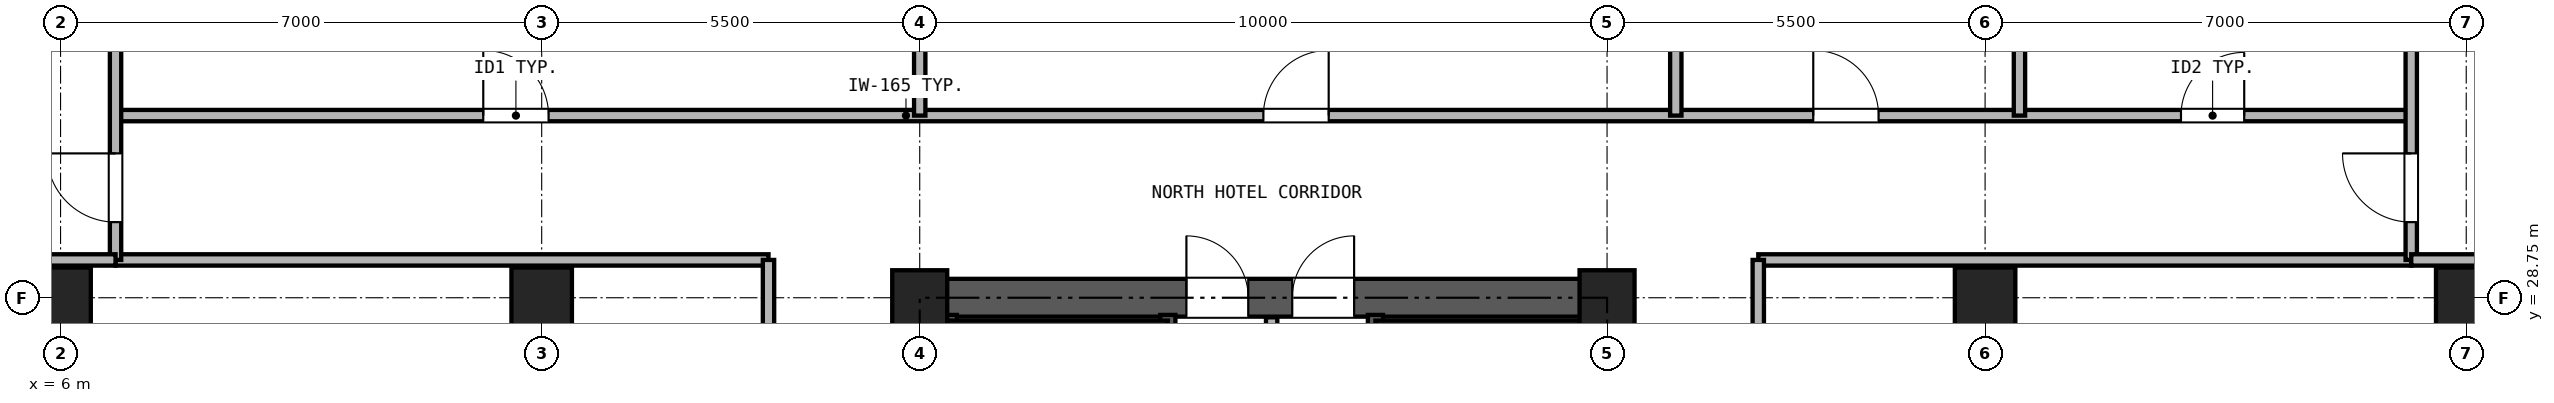
"""IFC4 building model, lengths in metres.
Left out: names, types, materials, properties, quantities, classifications, styles, units other than length and angle.
Written with IfcOpenShell. Run it as: python <this file> out.ifc"""

import sys

from ifc_helpers import new_model, si_unit, direction, frame, frame_2d, origin, origin_2d, place, context, subcontext, project, spatial, rectangle, hollow_rectangle, extrude, source, transform, mapped, element, fill, save


model = new_model("IFC4")
c1 = context("Model", 3, precision=1e-05, world=origin(), true_north=direction((0.0, 1.0)))
c2 = subcontext(c1, "Body", "Model", "MODEL_VIEW")
j1 = project(units=[si_unit("LENGTHUNIT", "METRE"), si_unit("PLANEANGLEUNIT", "RADIAN")], contexts=[c1])
p1 = place(None, origin())
s1 = spatial("IfcSite", under=j1, at=p1, CompositionType="ELEMENT")
p2 = place(p1, origin())
s2 = spatial("IfcBuilding", under=s1, at=p2, CompositionType="ELEMENT")
p3 = place(p2, frame((0.0, 0.0, 92.7)))
s3 = spatial("IfcBuildingStorey", under=s2, at=p3, CompositionType="ELEMENT", Elevation=92.7)
m1 = source(origin(), c2, "Body", "SweptSolid", [
    extrude(hollow_rectangle(XDim=0.88, YDim=0.88, WallThickness=0.05, at=origin_2d()), origin(), (0.0, 0.0, 1.0), 2.95),
])
for number, where, z_axis, x_axis in (
    (1, (6.0, 28.75, 0.0), (0.0, 0.0, 1.0), (1.0, 0.0, 0.0)),
    (2, (13.0, 28.75, 0.0), (0.0, 0.0, 1.0), (1.0, 0.0, 0.0)),
):
    element("IfcColumn", number, at=place(p3, frame(where, z_axis=z_axis, x_axis=x_axis)), inside=s3, PredefinedType="COLUMN", context=c2, shape_type="MappedRepresentation", body=[
        mapped(m1, transform((0.0, 0.0, 0.0), x_axis=(1.0, 0.0, 0.0), y_axis=(0.0, 1.0, 0.0), z_axis=(0.0, 0.0, 1.0), scale=1.0)),
    ])
m2 = source(origin(), c2, "Body", "SweptSolid", [
    extrude(hollow_rectangle(XDim=0.8, YDim=0.8, WallThickness=0.045, at=origin_2d()), origin(), (0.0, 0.0, 1.0), 2.95),
])
for number, where, z_axis, x_axis in (
    (3, (18.5, 28.75, 0.0), (0.0, 0.0, 1.0), (1.0, 0.0, 0.0)),
    (4, (28.5, 28.75, 0.0), (0.0, 0.0, 1.0), (1.0, 0.0, 0.0)),
):
    element("IfcColumn", number, at=place(p3, frame(where, z_axis=z_axis, x_axis=x_axis)), inside=s3, PredefinedType="COLUMN", context=c2, shape_type="MappedRepresentation", body=[
        mapped(m2, transform((0.0, 0.0, 0.0), x_axis=(1.0, 0.0, 0.0), y_axis=(0.0, 1.0, 0.0), z_axis=(0.0, 0.0, 1.0), scale=1.0)),
    ])
for number, where, z_axis, x_axis in (
    (5, (34.0, 28.75, 0.0), (0.0, 0.0, 1.0), (1.0, 0.0, 0.0)),
    (6, (41.0, 28.75, 0.0), (0.0, 0.0, 1.0), (1.0, 0.0, 0.0)),
):
    element("IfcColumn", number, at=place(p3, frame(where, z_axis=z_axis, x_axis=x_axis)), inside=s3, PredefinedType="COLUMN", context=c2, shape_type="MappedRepresentation", body=[
        mapped(m1, transform((0.0, 0.0, 0.0), x_axis=(1.0, 0.0, 0.0), y_axis=(0.0, 1.0, 0.0), z_axis=(0.0, 0.0, 1.0), scale=1.0)),
    ])
p4 = place(p3, frame((18.225, 28.75, 0.0), z_axis=(0.0, 0.0, 1.0), x_axis=(1.0, 0.0, 0.0)))
e7 = element("IfcWall", 7, at=p4, inside=s3, PredefinedType="SHEAR", context=c2, shape_type="SweptSolid", body=[
    extrude(rectangle(XDim=10.55, YDim=0.55, at=frame_2d((5.275, 0.0))), origin(), (0.0, 0.0, 1.0), 2.95),
])
p5 = place(p4, frame((4.155, 0.0, 0.0)))
e8 = element("IfcOpeningElement", 8, at=p5, cuts=e7, PredefinedType="OPENING", context=c2, shape_type="SweptSolid", body=[
    extrude(rectangle(XDim=0.9, YDim=2.05, at=frame_2d((0.45, 1.025))), frame((0.0, 0.285, 0.0), z_axis=(0.0, -1.0, 0.0), x_axis=(1.0, 0.0, 0.0)), (0.0, 0.0, 1.0), 0.57),
])
p6 = place(p4, frame((5.695, 0.0, 0.0)))
e9 = element("IfcOpeningElement", 9, at=p6, cuts=e7, PredefinedType="OPENING", context=c2, shape_type="SweptSolid", body=[
    extrude(rectangle(XDim=0.9, YDim=2.05, at=frame_2d((0.45, 1.025))), frame((0.0, 0.285, 0.0), z_axis=(0.0, -1.0, 0.0), x_axis=(1.0, 0.0, 0.0)), (0.0, 0.0, 1.0), 0.57),
])
p7 = place(p3, frame((18.5, 11.775, 0.0), z_axis=(0.0, 0.0, 1.0), x_axis=(0.0, 1.0, 0.0)))
e10 = element("IfcWall", 10, at=p7, inside=s3, PredefinedType="SHEAR", context=c2, shape_type="SweptSolid", body=[
    extrude(rectangle(XDim=16.7, YDim=0.55, at=frame_2d((8.35, 0.0))), origin(), (0.0, 0.0, 1.0), 2.95),
])
p8 = place(p7, frame((7.375, 0.0, 0.0)))
e11 = element("IfcOpeningElement", 11, at=p8, cuts=e10, PredefinedType="OPENING", context=c2, shape_type="SweptSolid", body=[
    extrude(rectangle(XDim=1.15, YDim=2.2, at=frame_2d((0.575, 1.1))), frame((0.0, 0.285, 0.0), z_axis=(0.0, -1.0, 0.0), x_axis=(1.0, 0.0, 0.0)), (0.0, 0.0, 1.0), 0.57),
])
p9 = place(p3, frame((28.5, 11.775, 0.0), z_axis=(0.0, 0.0, 1.0), x_axis=(0.0, 1.0, 0.0)))
e12 = element("IfcWall", 12, at=p9, inside=s3, PredefinedType="SHEAR", context=c2, shape_type="SweptSolid", body=[
    extrude(rectangle(XDim=16.7, YDim=0.55, at=frame_2d((8.35, 0.0))), origin(), (0.0, 0.0, 1.0), 2.95),
])
p10 = place(p9, frame((7.375, 0.0, 0.0)))
e13 = element("IfcOpeningElement", 13, at=p10, cuts=e12, PredefinedType="OPENING", context=c2, shape_type="SweptSolid", body=[
    extrude(rectangle(XDim=1.15, YDim=2.2, at=frame_2d((0.575, 1.1))), frame((0.0, 0.285, 0.0), z_axis=(0.0, -1.0, 0.0), x_axis=(1.0, 0.0, 0.0)), (0.0, 0.0, 1.0), 0.57),
])
for number, where, z_axis, x_axis in (
    (14, (18.93, 21.39, 0.0), (0.0, 0.0, 1.0), (0.0, 1.0, 0.0)),
    (15, (22.11, 21.39, 0.0), (0.0, 0.0, 1.0), (0.0, 1.0, 0.0)),
    (16, (25.13, 21.39, 0.0), (0.0, 0.0, 1.0), (0.0, 1.0, 0.0)),
):
    element("IfcWall", number, at=place(p3, frame(where, z_axis=z_axis, x_axis=x_axis)), inside=s3, PredefinedType="SOLIDWALL", context=c2, shape_type="SweptSolid", body=[
        extrude(rectangle(XDim=7.11, YDim=0.22, at=frame_2d((3.555, 0.0))), origin(), (0.0, 0.0, 1.0), 2.95),
    ])
p11 = place(p3, frame((18.785, 28.335, 0.0), z_axis=(0.0, 0.0, 1.0), x_axis=(1.0, 0.0, 0.0)))
e17 = element("IfcWall", 17, at=p11, inside=s3, PredefinedType="PARTITIONING", context=c2, shape_type="SweptSolid", body=[
    extrude(rectangle(XDim=3.325, YDim=0.165, at=frame_2d((1.663, 0.0))), origin(), (0.0, 0.0, 1.0), 2.95),
])
p12 = place(p3, frame((25.13, 28.335, 0.0), z_axis=(0.0, 0.0, 1.0), x_axis=(1.0, 0.0, 0.0)))
e18 = element("IfcWall", 18, at=p12, inside=s3, PredefinedType="PARTITIONING", context=c2, shape_type="SweptSolid", body=[
    extrude(rectangle(XDim=3.085, YDim=0.165, at=frame_2d((1.542, 0.0))), origin(), (0.0, 0.0, 1.0), 2.95),
])
p13 = place(p3, frame((23.62, 24.4, 0.0), z_axis=(0.0, 0.0, 1.0), x_axis=(0.0, 1.0, 0.0)))
e19 = element("IfcWall", 19, at=p13, inside=s3, PredefinedType="PARTITIONING", context=c2, shape_type="SweptSolid", body=[
    extrude(rectangle(XDim=4.065, YDim=0.165, at=frame_2d((2.033, 0.0))), origin(), (0.0, 0.0, 1.0), 2.95),
])
p14 = place(p3, frame((6.8, 31.4, 0.0), z_axis=(0.0, 0.0, 1.0), x_axis=(1.0, 0.0, 0.0)))
e20 = element("IfcWall", 20, at=p14, inside=s3, PredefinedType="PARTITIONING", context=c2, shape_type="SweptSolid", body=[
    extrude(rectangle(XDim=33.4, YDim=0.165, at=frame_2d((16.7, 0.0))), origin(), (0.0, 0.0, 1.0), 2.583),
])
p15 = place(p14, frame((5.35, 0.0, 0.0)))
e21 = element("IfcOpeningElement", 21, at=p15, cuts=e20, PredefinedType="OPENING", context=c2, shape_type="SweptSolid", body=[
    extrude(rectangle(XDim=0.95, YDim=2.15, at=frame_2d((0.475, 1.075))), frame((0.0, 0.093, 0.0), z_axis=(0.0, -1.0, 0.0), x_axis=(1.0, 0.0, 0.0)), (0.0, 0.0, 1.0), 0.185),
])
p16 = place(p14, frame((16.7, 0.0, 0.0)))
e22 = element("IfcOpeningElement", 22, at=p16, cuts=e20, PredefinedType="OPENING", context=c2, shape_type="SweptSolid", body=[
    extrude(rectangle(XDim=0.95, YDim=2.15, at=frame_2d((0.475, 1.075))), frame((0.0, 0.093, 0.0), z_axis=(0.0, -1.0, 0.0), x_axis=(1.0, 0.0, 0.0)), (0.0, 0.0, 1.0), 0.185),
])
p17 = place(p14, frame((24.7, 0.0, 0.0)))
e23 = element("IfcOpeningElement", 23, at=p17, cuts=e20, PredefinedType="OPENING", context=c2, shape_type="SweptSolid", body=[
    extrude(rectangle(XDim=0.95, YDim=2.15, at=frame_2d((0.475, 1.075))), frame((0.0, 0.093, 0.0), z_axis=(0.0, -1.0, 0.0), x_axis=(1.0, 0.0, 0.0)), (0.0, 0.0, 1.0), 0.185),
])
p18 = place(p14, frame((30.05, 0.0, 0.0)))
e24 = element("IfcOpeningElement", 24, at=p18, cuts=e20, PredefinedType="OPENING", context=c2, shape_type="SweptSolid", body=[
    extrude(rectangle(XDim=0.92, YDim=2.1, at=frame_2d((0.46, 1.05))), frame((0.0, 0.093, 0.0), z_axis=(0.0, -1.0, 0.0), x_axis=(1.0, 0.0, 0.0)), (0.0, 0.0, 1.0), 0.185),
])
for number, where, z_axis, x_axis in (
    (25, (6.8, 29.3, 0.0), (0.0, 0.0, 1.0), (1.0, 0.0, 0.0)),
    (26, (30.7, 29.3, 0.0), (0.0, 0.0, 1.0), (1.0, 0.0, 0.0)),
):
    element("IfcWall", number, at=place(p3, frame(where, z_axis=z_axis, x_axis=x_axis)), inside=s3, PredefinedType="PARTITIONING", context=c2, shape_type="SweptSolid", body=[
        extrude(rectangle(XDim=9.5, YDim=0.165, at=frame_2d((4.75, 0.0))), origin(), (0.0, 0.0, 1.0), 2.95),
    ])
p19 = place(p3, frame((16.3, 11.05, 0.0), z_axis=(0.0, 0.0, 1.0), x_axis=(0.0, 1.0, 0.0)))
e27 = element("IfcWall", 27, at=p19, inside=s3, PredefinedType="PARTITIONING", context=c2, shape_type="SweptSolid", body=[
    extrude(rectangle(XDim=18.25, YDim=0.165, at=frame_2d((9.125, 0.0))), origin(), (0.0, 0.0, 1.0), 2.95),
])
p20 = place(p19, frame((4.062, 0.0, 0.0)))
e28 = element("IfcOpeningElement", 28, at=p20, cuts=e27, PredefinedType="OPENING", context=c2, shape_type="SweptSolid", body=[
    extrude(rectangle(XDim=0.95, YDim=2.15, at=frame_2d((0.475, 1.075))), frame((0.0, 0.093, 0.0), z_axis=(0.0, -1.0, 0.0), x_axis=(1.0, 0.0, 0.0)), (0.0, 0.0, 1.0), 0.185),
])
p21 = place(p19, frame((13.187, 0.0, 0.0)))
e29 = element("IfcOpeningElement", 29, at=p21, cuts=e27, PredefinedType="OPENING", context=c2, shape_type="SweptSolid", body=[
    extrude(rectangle(XDim=0.95, YDim=2.15, at=frame_2d((0.475, 1.075))), frame((0.0, 0.093, 0.0), z_axis=(0.0, -1.0, 0.0), x_axis=(1.0, 0.0, 0.0)), (0.0, 0.0, 1.0), 0.185),
])
p22 = place(p3, frame((30.7, 11.05, 0.0), z_axis=(0.0, 0.0, 1.0), x_axis=(0.0, 1.0, 0.0)))
e30 = element("IfcWall", 30, at=p22, inside=s3, PredefinedType="PARTITIONING", context=c2, shape_type="SweptSolid", body=[
    extrude(rectangle(XDim=18.25, YDim=0.165, at=frame_2d((9.125, 0.0))), origin(), (0.0, 0.0, 1.0), 2.95),
])
p23 = place(p22, frame((8.625, 0.0, 0.0)))
e31 = element("IfcOpeningElement", 31, at=p23, cuts=e30, PredefinedType="OPENING", context=c2, shape_type="SweptSolid", body=[
    extrude(rectangle(XDim=0.95, YDim=2.15, at=frame_2d((0.475, 1.075))), frame((0.0, 0.093, 0.0), z_axis=(0.0, -1.0, 0.0), x_axis=(1.0, 0.0, 0.0)), (0.0, 0.0, 1.0), 0.185),
])
p24 = place(p3, frame((6.8, 29.3, 0.0), z_axis=(0.0, 0.0, 1.0), x_axis=(0.0, 1.0, 0.0)))
e32 = element("IfcWall", 32, at=p24, inside=s3, PredefinedType="PARTITIONING", context=c2, shape_type="SweptSolid", body=[
    extrude(rectangle(XDim=5.84, YDim=0.165, at=frame_2d((2.92, 0.0))), origin(), (0.0, 0.0, 1.0), 2.95),
])
p25 = place(p24, frame((0.55, 0.0, 0.0)))
e33 = element("IfcOpeningElement", 33, at=p25, cuts=e32, PredefinedType="OPENING", context=c2, shape_type="SweptSolid", body=[
    extrude(rectangle(XDim=1.0, YDim=2.15, at=frame_2d((0.5, 1.075))), frame((0.0, 0.093, 0.0), z_axis=(0.0, -1.0, 0.0), x_axis=(1.0, 0.0, 0.0)), (0.0, 0.0, 1.0), 0.185),
])
p26 = place(p3, frame((40.2, 29.3, 0.0), z_axis=(0.0, 0.0, 1.0), x_axis=(0.0, 1.0, 0.0)))
e34 = element("IfcWall", 34, at=p26, inside=s3, PredefinedType="PARTITIONING", context=c2, shape_type="SweptSolid", body=[
    extrude(rectangle(XDim=5.84, YDim=0.165, at=frame_2d((2.92, 0.0))), origin(), (0.0, 0.0, 1.0), 2.95),
])
p27 = place(p26, frame((0.55, 0.0, 0.0)))
e35 = element("IfcOpeningElement", 35, at=p27, cuts=e34, PredefinedType="OPENING", context=c2, shape_type="SweptSolid", body=[
    extrude(rectangle(XDim=1.0, YDim=2.15, at=frame_2d((0.5, 1.075))), frame((0.0, 0.093, 0.0), z_axis=(0.0, -1.0, 0.0), x_axis=(1.0, 0.0, 0.0)), (0.0, 0.0, 1.0), 0.185),
])
for number, where, z_axis, x_axis in (
    (36, (0.16, 29.3, 0.0), (0.0, 0.0, 1.0), (1.0, 0.0, 0.0)),
    (37, (40.2, 29.3, 0.0), (0.0, 0.0, 1.0), (1.0, 0.0, 0.0)),
):
    element("IfcWall", number, at=place(p3, frame(where, z_axis=z_axis, x_axis=x_axis)), inside=s3, PredefinedType="PARTITIONING", context=c2, shape_type="SweptSolid", body=[
        extrude(rectangle(XDim=6.64, YDim=0.165, at=frame_2d((3.32, 0.0))), origin(), (0.0, 0.0, 1.0), 2.95),
    ])
p28 = place(p3, frame((18.5, 31.4, 0.0), z_axis=(0.0, 0.0, 1.0), x_axis=(0.0, 1.0, 0.0)))
e38 = element("IfcWall", 38, at=p28, inside=s3, PredefinedType="PARTITIONING", context=c2, shape_type="SweptSolid", body=[
    extrude(rectangle(XDim=3.74, YDim=0.165, at=frame_2d((1.87, 0.0))), origin(), (0.0, 0.0, 1.0), 2.247),
])
for number, where, z_axis, x_axis in (
    (39, (29.5, 31.4, 0.0), (0.0, 0.0, 1.0), (0.0, 1.0, 0.0)),
    (40, (34.5, 31.4, 0.0), (0.0, 0.0, 1.0), (0.0, 1.0, 0.0)),
):
    element("IfcWall", number, at=place(p3, frame(where, z_axis=z_axis, x_axis=x_axis)), inside=s3, PredefinedType="PARTITIONING", context=c2, shape_type="SweptSolid", body=[
        extrude(rectangle(XDim=3.74, YDim=0.165, at=frame_2d((1.87, 0.0))), origin(), (0.0, 0.0, 1.0), 2.95),
    ])
p29 = place(p5, origin())
e41 = element("IfcDoor", 41, at=p29, inside=s3, OperationType="SINGLE_SWING_LEFT", PredefinedType="DOOR", context=c2, shape_type="SweptSolid", body=[
    extrude(rectangle(XDim=0.9, YDim=2.05, at=frame_2d((0.45, 1.025))), frame((0.0, 0.025, 0.0), z_axis=(0.0, -1.0, 0.0), x_axis=(1.0, 0.0, 0.0)), (0.0, 0.0, 1.0), 0.05),
])
fill(e8, e41)
p30 = place(p6, origin())
e42 = element("IfcDoor", 42, at=p30, inside=s3, OperationType="SINGLE_SWING_RIGHT", PredefinedType="DOOR", context=c2, shape_type="SweptSolid", body=[
    extrude(rectangle(XDim=0.9, YDim=2.05, at=frame_2d((0.45, 1.025))), frame((0.0, 0.025, 0.0), z_axis=(0.0, -1.0, 0.0), x_axis=(1.0, 0.0, 0.0)), (0.0, 0.0, 1.0), 0.05),
])
fill(e9, e42)
p31 = place(p25, origin())
e43 = element("IfcDoor", 43, at=p31, inside=s3, OperationType="SINGLE_SWING_RIGHT", PredefinedType="DOOR", context=c2, shape_type="SweptSolid", body=[
    extrude(rectangle(XDim=1.0, YDim=2.15, at=frame_2d((0.5, 1.075))), frame((0.0, 0.025, 0.0), z_axis=(0.0, -1.0, 0.0), x_axis=(1.0, 0.0, 0.0)), (0.0, 0.0, 1.0), 0.05),
])
fill(e33, e43)
p32 = place(p27, frame((1.0, 0.0, 0.0), z_axis=(0.0, 0.0, 1.0), x_axis=(-1.0, 0.0, 0.0)))
e44 = element("IfcDoor", 44, at=p32, inside=s3, OperationType="SINGLE_SWING_RIGHT", PredefinedType="DOOR", context=c2, shape_type="SweptSolid", body=[
    extrude(rectangle(XDim=1.0, YDim=2.15, at=frame_2d((0.5, 1.075))), frame((0.0, 0.025, 0.0), z_axis=(0.0, -1.0, 0.0), x_axis=(1.0, 0.0, 0.0)), (0.0, 0.0, 1.0), 0.05),
])
fill(e35, e44)
p33 = place(p15, origin())
e45 = element("IfcDoor", 45, at=p33, inside=s3, OperationType="SINGLE_SWING_LEFT", PredefinedType="DOOR", context=c2, shape_type="SweptSolid", body=[
    extrude(rectangle(XDim=0.95, YDim=2.15, at=frame_2d((0.475, 1.075))), frame((0.0, 0.025, 0.0), z_axis=(0.0, -1.0, 0.0), x_axis=(1.0, 0.0, 0.0)), (0.0, 0.0, 1.0), 0.05),
])
fill(e21, e45)
p34 = place(p16, origin())
e46 = element("IfcDoor", 46, at=p34, inside=s3, OperationType="SINGLE_SWING_RIGHT", PredefinedType="DOOR", context=c2, shape_type="SweptSolid", body=[
    extrude(rectangle(XDim=0.95, YDim=2.15, at=frame_2d((0.475, 1.075))), frame((0.0, 0.025, 0.0), z_axis=(0.0, -1.0, 0.0), x_axis=(1.0, 0.0, 0.0)), (0.0, 0.0, 1.0), 0.05),
])
fill(e22, e46)
p35 = place(p17, origin())
e47 = element("IfcDoor", 47, at=p35, inside=s3, OperationType="SINGLE_SWING_LEFT", PredefinedType="DOOR", context=c2, shape_type="SweptSolid", body=[
    extrude(rectangle(XDim=0.95, YDim=2.15, at=frame_2d((0.475, 1.075))), frame((0.0, 0.025, 0.0), z_axis=(0.0, -1.0, 0.0), x_axis=(1.0, 0.0, 0.0)), (0.0, 0.0, 1.0), 0.05),
])
fill(e23, e47)
p36 = place(p18, origin())
e48 = element("IfcDoor", 48, at=p36, inside=s3, OperationType="SINGLE_SWING_RIGHT", PredefinedType="DOOR", context=c2, shape_type="SweptSolid", body=[
    extrude(rectangle(XDim=0.92, YDim=2.1, at=frame_2d((0.46, 1.05))), frame((0.0, 0.025, 0.0), z_axis=(0.0, -1.0, 0.0), x_axis=(1.0, 0.0, 0.0)), (0.0, 0.0, 1.0), 0.05),
])
fill(e24, e48)
save(model, sys.argv[1])
